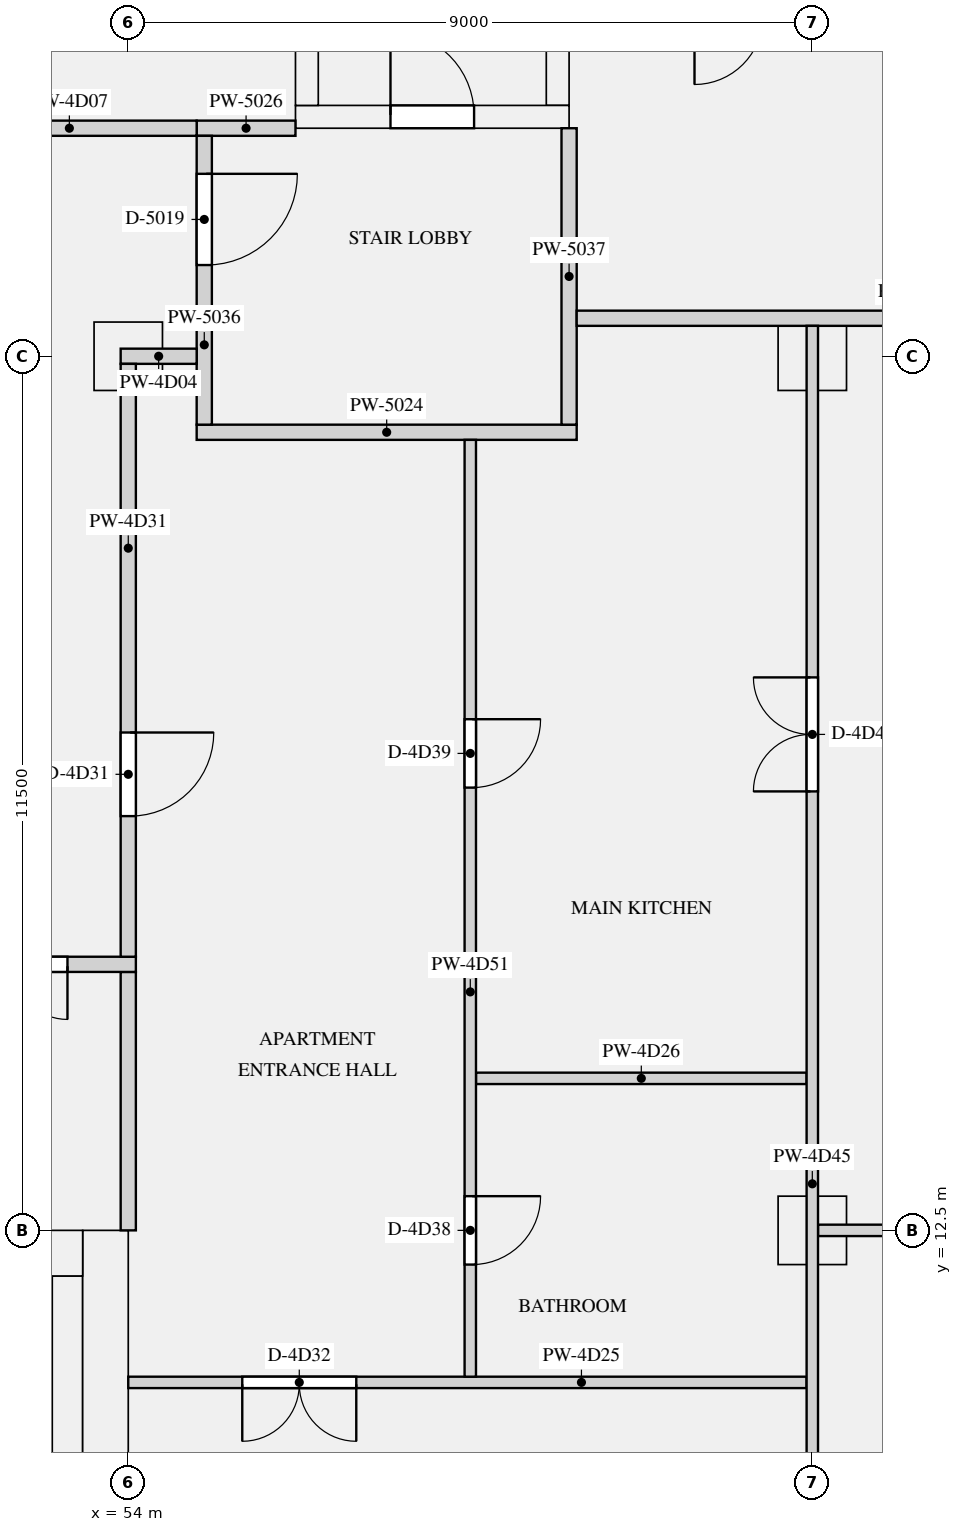
"""IFC4 building model, lengths in metres.
Left out: names, types, materials, properties, quantities, classifications, styles, units other than length and angle.
Written with IfcOpenShell. Run it as: python <this file> out.ifc"""

import sys

from ifc_helpers import new_model, si_unit, direction, frame, frame_2d, origin, origin_2d, place, context, subcontext, project, spatial, rectangle, extrude, element, fill, save


model = new_model("IFC4")
c1 = context("Model", 3, precision=1e-05, world=origin(), true_north=direction((0.0, 1.0)))
c2 = subcontext(c1, "Body", "Model", "MODEL_VIEW")
j1 = project(units=[si_unit("LENGTHUNIT", "METRE"), si_unit("PLANEANGLEUNIT", "RADIAN")], contexts=[c1])
p1 = place(None, origin())
s1 = spatial("IfcSite", under=j1, at=p1, CompositionType="ELEMENT")
p2 = place(p1, origin())
s2 = spatial("IfcBuilding", under=s1, at=p2, CompositionType="ELEMENT")
p3 = place(p2, frame((0.0, 0.0, 223.2)))
s3 = spatial("IfcBuildingStorey", under=s2, at=p3, CompositionType="ELEMENT", Elevation=223.2)
for number, where, z_axis, x_axis in (
    (1, (54.0, 24.0, 0.0), (0.0, 0.0, 1.0), (1.0, 0.0, 0.0)),
    (2, (63.0, 24.0, 0.0), (0.0, 0.0, 1.0), (1.0, 0.0, 0.0)),
    (3, (63.0, 12.5, 0.0), (0.0, 0.0, 1.0), (1.0, 0.0, 0.0)),
):
    element("IfcColumn", number, at=place(p3, frame(where, z_axis=z_axis, x_axis=x_axis)), inside=s3, PredefinedType="COLUMN", context=c2, shape_type="SweptSolid", body=[
        extrude(rectangle(XDim=0.9, YDim=0.9, at=origin_2d()), origin(), (0.0, 0.0, 1.0), 3.15),
    ])
p4 = place(p3, frame((53.7, 0.0, 0.0), z_axis=(0.0, 0.0, 1.0), x_axis=(0.0, 1.0, 0.0)))
e4 = element("IfcWall", 4, at=p4, inside=s3, PredefinedType="SHEAR", context=c2, shape_type="SweptSolid", body=[
    extrude(rectangle(XDim=12.5, YDim=0.6, at=frame_2d((6.25, 0.0))), origin(), (0.0, 0.0, 1.0), 3.15),
])
p5 = place(p3, frame((18.6, 12.2, 0.0), z_axis=(0.0, 0.0, 1.0), x_axis=(1.0, 0.0, 0.0)))
e5 = element("IfcWall", 5, at=p5, inside=s3, PredefinedType="SHEAR", context=c2, shape_type="SweptSolid", body=[
    extrude(rectangle(XDim=34.8, YDim=0.6, at=frame_2d((17.4, 0.0))), origin(), (0.0, 0.0, 1.0), 3.15),
])
p6 = place(p5, frame((24.575, 0.0, 0.0)))
e6 = element("IfcOpeningElement", 6, at=p6, cuts=e5, PredefinedType="OPENING", context=c2, shape_type="SweptSolid", body=[
    extrude(rectangle(XDim=1.1, YDim=2.1, at=frame_2d((0.55, 1.05))), frame((0.0, 0.31, 0.0), z_axis=(0.0, -1.0, 0.0), x_axis=(1.0, 0.0, 0.0)), (0.0, 0.0, 1.0), 0.62),
])
p7 = place(p5, frame((26.825, 0.0, 0.0)))
e7 = element("IfcOpeningElement", 7, at=p7, cuts=e5, PredefinedType="OPENING", context=c2, shape_type="SweptSolid", body=[
    extrude(rectangle(XDim=1.1, YDim=2.1, at=frame_2d((0.55, 1.05))), frame((0.0, 0.31, 0.0), z_axis=(0.0, -1.0, 0.0), x_axis=(1.0, 0.0, 0.0)), (0.0, 0.0, 1.0), 0.62),
])
p8 = place(p5, frame((29.075, 0.0, 0.0)))
e8 = element("IfcOpeningElement", 8, at=p8, cuts=e5, PredefinedType="OPENING", context=c2, shape_type="SweptSolid", body=[
    extrude(rectangle(XDim=1.1, YDim=2.1, at=frame_2d((0.55, 1.05))), frame((0.0, 0.31, 0.0), z_axis=(0.0, -1.0, 0.0), x_axis=(1.0, 0.0, 0.0)), (0.0, 0.0, 1.0), 0.62),
])
p9 = place(p5, frame((11.95, 0.0, 0.0)))
e9 = element("IfcOpeningElement", 9, at=p9, cuts=e5, PredefinedType="OPENING", context=c2, shape_type="SweptSolid", body=[
    extrude(rectangle(XDim=0.9, YDim=2.1, at=frame_2d((0.45, 1.05))), frame((0.0, 0.31, 0.0), z_axis=(0.0, -1.0, 0.0), x_axis=(1.0, 0.0, 0.0)), (0.0, 0.0, 1.0), 0.62),
])
p10 = place(p5, frame((18.45, 0.0, 0.0)))
e10 = element("IfcOpeningElement", 10, at=p10, cuts=e5, PredefinedType="OPENING", context=c2, shape_type="SweptSolid", body=[
    extrude(rectangle(XDim=0.9, YDim=2.1, at=frame_2d((0.45, 1.05))), frame((0.0, 0.31, 0.0), z_axis=(0.0, -1.0, 0.0), x_axis=(1.0, 0.0, 0.0)), (0.0, 0.0, 1.0), 0.62),
])
p11 = place(p5, frame((1.55, 0.0, 0.0)))
e11 = element("IfcOpeningElement", 11, at=p11, cuts=e5, PredefinedType="OPENING", context=c2, shape_type="SweptSolid", body=[
    extrude(rectangle(XDim=1.2, YDim=2.1, at=frame_2d((0.6, 1.05))), frame((0.0, 0.31, 0.0), z_axis=(0.0, -1.0, 0.0), x_axis=(1.0, 0.0, 0.0)), (0.0, 0.0, 1.0), 0.62),
])
p12 = place(p5, frame((32.05, 0.0, 0.0)))
e12 = element("IfcOpeningElement", 12, at=p12, cuts=e5, PredefinedType="OPENING", context=c2, shape_type="SweptSolid", body=[
    extrude(rectangle(XDim=1.2, YDim=2.1, at=frame_2d((0.6, 1.05))), frame((0.0, 0.31, 0.0), z_axis=(0.0, -1.0, 0.0), x_axis=(1.0, 0.0, 0.0)), (0.0, 0.0, 1.0), 0.62),
])
p13 = place(p3, frame((53.2, 1.0, 0.0), z_axis=(0.0, 0.0, 1.0), x_axis=(0.0, 1.0, 0.0)))
e13 = element("IfcWall", 13, at=p13, inside=s3, PredefinedType="SHEAR", context=c2, shape_type="SweptSolid", body=[
    extrude(rectangle(XDim=10.9, YDim=0.4, at=frame_2d((5.45, 0.0))), origin(), (0.0, 0.0, 1.0), 3.15),
])
p14 = place(p3, frame((56.2, 27.15, 0.0), z_axis=(0.0, 0.0, 1.0), x_axis=(1.0, 0.0, 0.0)))
e14 = element("IfcWall", 14, at=p14, inside=s3, PredefinedType="SHEAR", context=c2, shape_type="SweptSolid", body=[
    extrude(rectangle(XDim=3.6, YDim=0.3, at=frame_2d((1.8, 0.0))), origin(), (0.0, 0.0, 1.0), 3.15),
])
p15 = place(p14, frame((1.25, 0.0, 0.0)))
e15 = element("IfcOpeningElement", 15, at=p15, cuts=e14, PredefinedType="OPENING", context=c2, shape_type="SweptSolid", body=[
    extrude(rectangle(XDim=1.1, YDim=2.1, at=frame_2d((0.55, 1.05))), frame((0.0, 0.16, 0.0), z_axis=(0.0, -1.0, 0.0), x_axis=(1.0, 0.0, 0.0)), (0.0, 0.0, 1.0), 0.32),
])
for number, where, z_axis, x_axis in (
    (16, (56.35, 27.3, 0.0), (0.0, 0.0, 1.0), (0.0, 1.0, 0.0)),
    (17, (59.65, 27.3, 0.0), (0.0, 0.0, 1.0), (0.0, 1.0, 0.0)),
):
    element("IfcWall", number, at=place(p3, frame(where, z_axis=z_axis, x_axis=x_axis)), inside=s3, PredefinedType="SHEAR", context=c2, shape_type="SweptSolid", body=[
        extrude(rectangle(XDim=7.8, YDim=0.3, at=frame_2d((3.9, 0.0))), origin(), (0.0, 0.0, 1.0), 3.15),
    ])
p16 = place(p3, frame((54.9, 23.0, 0.0), z_axis=(0.0, 0.0, 1.0), x_axis=(1.0, 0.0, 0.0)))
e18 = element("IfcWall", 18, at=p16, inside=s3, PredefinedType="PARTITIONING", context=c2, shape_type="SweptSolid", body=[
    extrude(rectangle(XDim=5.0, YDim=0.2, at=frame_2d((2.5, 0.0))), origin(), (0.0, 0.0, 1.0), 2.83),
])
p17 = place(p3, frame((54.9, 27.0, 0.0), z_axis=(0.0, 0.0, 1.0), x_axis=(1.0, 0.0, 0.0)))
e19 = element("IfcWall", 19, at=p17, inside=s3, PredefinedType="PARTITIONING", context=c2, shape_type="SweptSolid", body=[
    extrude(rectangle(XDim=1.3, YDim=0.2, at=frame_2d((0.65, 0.0))), origin(), (0.0, 0.0, 1.0), 2.83),
])
p18 = place(p3, frame((54.0, 12.5, 0.0), z_axis=(0.0, 0.0, 1.0), x_axis=(0.0, 1.0, 0.0)))
e20 = element("IfcWall", 20, at=p18, inside=s3, PredefinedType="PARTITIONING", context=c2, shape_type="SweptSolid", body=[
    extrude(rectangle(XDim=3.4, YDim=0.2, at=frame_2d((1.7, 0.0))), origin(), (0.0, 0.0, 1.0), 2.83),
])
p19 = place(p3, frame((55.0, 23.1, 0.0), z_axis=(0.0, 0.0, 1.0), x_axis=(0.0, 1.0, 0.0)))
e21 = element("IfcWall", 21, at=p19, inside=s3, PredefinedType="PARTITIONING", context=c2, shape_type="SweptSolid", body=[
    extrude(rectangle(XDim=3.8, YDim=0.2, at=frame_2d((1.9, 0.0))), origin(), (0.0, 0.0, 1.0), 2.83),
])
p20 = place(p19, frame((2.1, 0.0, 0.0)))
e22 = element("IfcOpeningElement", 22, at=p20, cuts=e21, PredefinedType="OPENING", context=c2, shape_type="SweptSolid", body=[
    extrude(rectangle(XDim=1.2, YDim=2.1, at=frame_2d((0.6, 1.05))), frame((0.0, 0.11, 0.0), z_axis=(0.0, -1.0, 0.0), x_axis=(1.0, 0.0, 0.0)), (0.0, 0.0, 1.0), 0.22),
])
p21 = place(p3, frame((59.8, 23.1, 0.0), z_axis=(0.0, 0.0, 1.0), x_axis=(0.0, 1.0, 0.0)))
e23 = element("IfcWall", 23, at=p21, inside=s3, PredefinedType="PARTITIONING", context=c2, shape_type="SweptSolid", body=[
    extrude(rectangle(XDim=3.9, YDim=0.2, at=frame_2d((1.95, 0.0))), origin(), (0.0, 0.0, 1.0), 2.83),
])
p22 = place(p3, frame((53.9, 24.0, 0.0), z_axis=(0.0, 0.0, 1.0), x_axis=(1.0, 0.0, 0.0)))
e24 = element("IfcWall", 24, at=p22, inside=s3, PredefinedType="PARTITIONING", context=c2, shape_type="SweptSolid", body=[
    extrude(rectangle(XDim=1.0, YDim=0.2, at=frame_2d((0.5, 0.0))), origin(), (0.0, 0.0, 1.0), 2.83),
])
p23 = place(p3, frame((47.925, 27.0, 0.0), z_axis=(0.0, 0.0, 1.0), x_axis=(1.0, 0.0, 0.0)))
e25 = element("IfcWall", 25, at=p23, inside=s3, PredefinedType="PARTITIONING", context=c2, shape_type="SweptSolid", body=[
    extrude(rectangle(XDim=6.975, YDim=0.2, at=frame_2d((3.487, 0.0))), origin(), (0.0, 0.0, 1.0), 2.83),
])
p24 = place(p23, frame((2.525, 0.0, 0.0)))
e26 = element("IfcOpeningElement", 26, at=p24, cuts=e25, PredefinedType="OPENING", context=c2, shape_type="SweptSolid", body=[
    extrude(rectangle(XDim=1.1, YDim=2.1, at=frame_2d((0.55, 1.05))), frame((0.0, 0.11, 0.0), z_axis=(0.0, -1.0, 0.0), x_axis=(1.0, 0.0, 0.0)), (0.0, 0.0, 1.0), 0.22),
])
p25 = place(p3, frame((63.075, 12.5, 0.0), z_axis=(0.0, 0.0, 1.0), x_axis=(1.0, 0.0, 0.0)))
e27 = element("IfcWall", 27, at=p25, inside=s3, PredefinedType="PARTITIONING", context=c2, shape_type="SweptSolid", body=[
    extrude(rectangle(XDim=8.275, YDim=0.15, at=frame_2d((4.138, 0.0))), origin(), (0.0, 0.0, 1.0), 2.83),
])
p26 = place(p3, frame((59.9, 24.5, 0.0), z_axis=(0.0, 0.0, 1.0), x_axis=(1.0, 0.0, 0.0)))
e28 = element("IfcWall", 28, at=p26, inside=s3, PredefinedType="PARTITIONING", context=c2, shape_type="SweptSolid", body=[
    extrude(rectangle(XDim=8.95, YDim=0.2, at=frame_2d((4.475, 0.0))), origin(), (0.0, 0.0, 1.0), 2.83),
])
p27 = place(p3, frame((54.0, 10.5, 0.0), z_axis=(0.0, 0.0, 1.0), x_axis=(1.0, 0.0, 0.0)))
e29 = element("IfcWall", 29, at=p27, inside=s3, PredefinedType="PARTITIONING", context=c2, shape_type="SweptSolid", body=[
    extrude(rectangle(XDim=8.925, YDim=0.15, at=frame_2d((4.462, 0.0))), origin(), (0.0, 0.0, 1.0), 2.83),
])
p28 = place(p27, frame((1.5, 0.0, 0.0)))
e30 = element("IfcOpeningElement", 30, at=p28, cuts=e29, PredefinedType="OPENING", context=c2, shape_type="SweptSolid", body=[
    extrude(rectangle(XDim=1.5, YDim=2.1, at=frame_2d((0.75, 1.05))), frame((0.0, 0.085, 0.0), z_axis=(0.0, -1.0, 0.0), x_axis=(1.0, 0.0, 0.0)), (0.0, 0.0, 1.0), 0.17),
])
p29 = place(p3, frame((58.575, 14.5, 0.0), z_axis=(0.0, 0.0, 1.0), x_axis=(1.0, 0.0, 0.0)))
e31 = element("IfcWall", 31, at=p29, inside=s3, PredefinedType="PARTITIONING", context=c2, shape_type="SweptSolid", body=[
    extrude(rectangle(XDim=4.35, YDim=0.15, at=frame_2d((2.175, 0.0))), origin(), (0.0, 0.0, 1.0), 2.83),
])
p30 = place(p3, frame((17.9, 16.0, 0.0), z_axis=(0.0, 0.0, 1.0), x_axis=(1.0, 0.0, 0.0)))
e32 = element("IfcWall", 32, at=p30, inside=s3, PredefinedType="PARTITIONING", context=c2, shape_type="SweptSolid", body=[
    extrude(rectangle(XDim=36.2, YDim=0.2, at=frame_2d((18.1, 0.0))), origin(), (0.0, 0.0, 1.0), 2.83),
])
p31 = place(p30, frame((0.9, 0.0, 0.0)))
e33 = element("IfcOpeningElement", 33, at=p31, cuts=e32, PredefinedType="OPENING", context=c2, shape_type="SweptSolid", body=[
    extrude(rectangle(XDim=1.4, YDim=2.1, at=frame_2d((0.7, 1.05))), frame((0.0, 0.11, 0.0), z_axis=(0.0, -1.0, 0.0), x_axis=(1.0, 0.0, 0.0)), (0.0, 0.0, 1.0), 0.22),
])
p32 = place(p30, frame((33.9, 0.0, 0.0)))
e34 = element("IfcOpeningElement", 34, at=p32, cuts=e32, PredefinedType="OPENING", context=c2, shape_type="SweptSolid", body=[
    extrude(rectangle(XDim=1.4, YDim=2.1, at=frame_2d((0.7, 1.05))), frame((0.0, 0.11, 0.0), z_axis=(0.0, -1.0, 0.0), x_axis=(1.0, 0.0, 0.0)), (0.0, 0.0, 1.0), 0.22),
])
p33 = place(p3, frame((54.0, 16.1, 0.0), z_axis=(0.0, 0.0, 1.0), x_axis=(0.0, 1.0, 0.0)))
e35 = element("IfcWall", 35, at=p33, inside=s3, PredefinedType="PARTITIONING", context=c2, shape_type="SweptSolid", body=[
    extrude(rectangle(XDim=7.8, YDim=0.2, at=frame_2d((3.9, 0.0))), origin(), (0.0, 0.0, 1.0), 2.83),
])
p34 = place(p33, frame((1.85, 0.0, 0.0)))
e36 = element("IfcOpeningElement", 36, at=p34, cuts=e35, PredefinedType="OPENING", context=c2, shape_type="SweptSolid", body=[
    extrude(rectangle(XDim=1.1, YDim=2.1, at=frame_2d((0.55, 1.05))), frame((0.0, 0.11, 0.0), z_axis=(0.0, -1.0, 0.0), x_axis=(1.0, 0.0, 0.0)), (0.0, 0.0, 1.0), 0.22),
])
p35 = place(p3, frame((63.0, 0.65, 0.0), z_axis=(0.0, 0.0, 1.0), x_axis=(0.0, 1.0, 0.0)))
e37 = element("IfcWall", 37, at=p35, inside=s3, PredefinedType="PARTITIONING", context=c2, shape_type="SweptSolid", body=[
    extrude(rectangle(XDim=23.75, YDim=0.15, at=frame_2d((11.875, 0.0))), origin(), (0.0, 0.0, 1.0), 2.83),
])
p36 = place(p35, frame((6.4, 0.0, 0.0)))
e38 = element("IfcOpeningElement", 38, at=p36, cuts=e37, PredefinedType="OPENING", context=c2, shape_type="SweptSolid", body=[
    extrude(rectangle(XDim=0.9, YDim=2.1, at=frame_2d((0.45, 1.05))), frame((0.0, 0.085, 0.0), z_axis=(0.0, -1.0, 0.0), x_axis=(1.0, 0.0, 0.0)), (0.0, 0.0, 1.0), 0.17),
])
p37 = place(p35, frame((17.625, 0.0, 0.0)))
e39 = element("IfcOpeningElement", 39, at=p37, cuts=e37, PredefinedType="OPENING", context=c2, shape_type="SweptSolid", body=[
    extrude(rectangle(XDim=1.5, YDim=2.1, at=frame_2d((0.75, 1.05))), frame((0.0, 0.085, 0.0), z_axis=(0.0, -1.0, 0.0), x_axis=(1.0, 0.0, 0.0)), (0.0, 0.0, 1.0), 0.17),
])
p38 = place(p3, frame((58.5, 10.575, 0.0), z_axis=(0.0, 0.0, 1.0), x_axis=(0.0, 1.0, 0.0)))
e40 = element("IfcWall", 40, at=p38, inside=s3, PredefinedType="PARTITIONING", context=c2, shape_type="SweptSolid", body=[
    extrude(rectangle(XDim=12.325, YDim=0.15, at=frame_2d((6.163, 0.0))), origin(), (0.0, 0.0, 1.0), 2.83),
])
p39 = place(p38, frame((1.475, 0.0, 0.0)))
e41 = element("IfcOpeningElement", 41, at=p39, cuts=e40, PredefinedType="OPENING", context=c2, shape_type="SweptSolid", body=[
    extrude(rectangle(XDim=0.9, YDim=2.1, at=frame_2d((0.45, 1.05))), frame((0.0, 0.085, 0.0), z_axis=(0.0, -1.0, 0.0), x_axis=(1.0, 0.0, 0.0)), (0.0, 0.0, 1.0), 0.17),
])
p40 = place(p38, frame((7.75, 0.0, 0.0)))
e42 = element("IfcOpeningElement", 42, at=p40, cuts=e40, PredefinedType="OPENING", context=c2, shape_type="SweptSolid", body=[
    extrude(rectangle(XDim=0.9, YDim=2.1, at=frame_2d((0.45, 1.05))), frame((0.0, 0.085, 0.0), z_axis=(0.0, -1.0, 0.0), x_axis=(1.0, 0.0, 0.0)), (0.0, 0.0, 1.0), 0.17),
])
p41 = place(p15, origin())
e43 = element("IfcDoor", 43, at=p41, inside=s3, OperationType="SINGLE_SWING_LEFT", PredefinedType="DOOR", context=c2, shape_type="SweptSolid", body=[
    extrude(rectangle(XDim=1.1, YDim=2.1, at=frame_2d((0.55, 1.05))), frame((0.0, 0.025, 0.0), z_axis=(0.0, -1.0, 0.0), x_axis=(1.0, 0.0, 0.0)), (0.0, 0.0, 1.0), 0.05),
])
fill(e15, e43)
p42 = place(p20, frame((1.2, 0.0, 0.0), z_axis=(0.0, 0.0, 1.0), x_axis=(-1.0, 0.0, 0.0)))
e44 = element("IfcDoor", 44, at=p42, inside=s3, OperationType="SINGLE_SWING_LEFT", PredefinedType="DOOR", context=c2, shape_type="SweptSolid", body=[
    extrude(rectangle(XDim=1.2, YDim=2.1, at=frame_2d((0.6, 1.05))), frame((0.0, 0.025, 0.0), z_axis=(0.0, -1.0, 0.0), x_axis=(1.0, 0.0, 0.0)), (0.0, 0.0, 1.0), 0.05),
])
fill(e22, e44)
p43 = place(p32, frame((1.4, 0.0, 0.0), z_axis=(0.0, 0.0, 1.0), x_axis=(-1.0, 0.0, 0.0)))
e45 = element("IfcDoor", 45, at=p43, inside=s3, OperationType="DOUBLE_DOOR_SINGLE_SWING", PredefinedType="DOOR", context=c2, shape_type="SweptSolid", body=[
    extrude(rectangle(XDim=1.4, YDim=2.1, at=frame_2d((0.7, 1.05))), frame((0.0, 0.025, 0.0), z_axis=(0.0, -1.0, 0.0), x_axis=(1.0, 0.0, 0.0)), (0.0, 0.0, 1.0), 0.05),
])
fill(e34, e45)
p44 = place(p34, frame((1.1, 0.0, 0.0), z_axis=(0.0, 0.0, 1.0), x_axis=(-1.0, 0.0, 0.0)))
e46 = element("IfcDoor", 46, at=p44, inside=s3, OperationType="SINGLE_SWING_LEFT", PredefinedType="DOOR", context=c2, shape_type="SweptSolid", body=[
    extrude(rectangle(XDim=1.1, YDim=2.1, at=frame_2d((0.55, 1.05))), frame((0.0, 0.025, 0.0), z_axis=(0.0, -1.0, 0.0), x_axis=(1.0, 0.0, 0.0)), (0.0, 0.0, 1.0), 0.05),
])
fill(e36, e46)
p45 = place(p28, frame((1.5, 0.0, 0.0), z_axis=(0.0, 0.0, 1.0), x_axis=(-1.0, 0.0, 0.0)))
e47 = element("IfcDoor", 47, at=p45, inside=s3, OperationType="DOUBLE_DOOR_SINGLE_SWING", PredefinedType="DOOR", context=c2, shape_type="SweptSolid", body=[
    extrude(rectangle(XDim=1.5, YDim=2.1, at=frame_2d((0.75, 1.05))), frame((0.0, 0.025, 0.0), z_axis=(0.0, -1.0, 0.0), x_axis=(1.0, 0.0, 0.0)), (0.0, 0.0, 1.0), 0.05),
])
fill(e30, e47)
p46 = place(p39, frame((0.9, 0.0, 0.0), z_axis=(0.0, 0.0, 1.0), x_axis=(-1.0, 0.0, 0.0)))
e48 = element("IfcDoor", 48, at=p46, inside=s3, OperationType="SINGLE_SWING_LEFT", PredefinedType="DOOR", context=c2, shape_type="SweptSolid", body=[
    extrude(rectangle(XDim=0.9, YDim=2.1, at=frame_2d((0.45, 1.05))), frame((0.0, 0.025, 0.0), z_axis=(0.0, -1.0, 0.0), x_axis=(1.0, 0.0, 0.0)), (0.0, 0.0, 1.0), 0.05),
])
fill(e41, e48)
p47 = place(p40, frame((0.9, 0.0, 0.0), z_axis=(0.0, 0.0, 1.0), x_axis=(-1.0, 0.0, 0.0)))
e49 = element("IfcDoor", 49, at=p47, inside=s3, OperationType="SINGLE_SWING_LEFT", PredefinedType="DOOR", context=c2, shape_type="SweptSolid", body=[
    extrude(rectangle(XDim=0.9, YDim=2.1, at=frame_2d((0.45, 1.05))), frame((0.0, 0.025, 0.0), z_axis=(0.0, -1.0, 0.0), x_axis=(1.0, 0.0, 0.0)), (0.0, 0.0, 1.0), 0.05),
])
fill(e42, e49)
p48 = place(p37, origin())
e50 = element("IfcDoor", 50, at=p48, inside=s3, OperationType="DOUBLE_DOOR_SINGLE_SWING", PredefinedType="DOOR", context=c2, shape_type="SweptSolid", body=[
    extrude(rectangle(XDim=1.5, YDim=2.1, at=frame_2d((0.75, 1.05))), frame((0.0, 0.025, 0.0), z_axis=(0.0, -1.0, 0.0), x_axis=(1.0, 0.0, 0.0)), (0.0, 0.0, 1.0), 0.05),
])
fill(e39, e50)
save(model, sys.argv[1])
